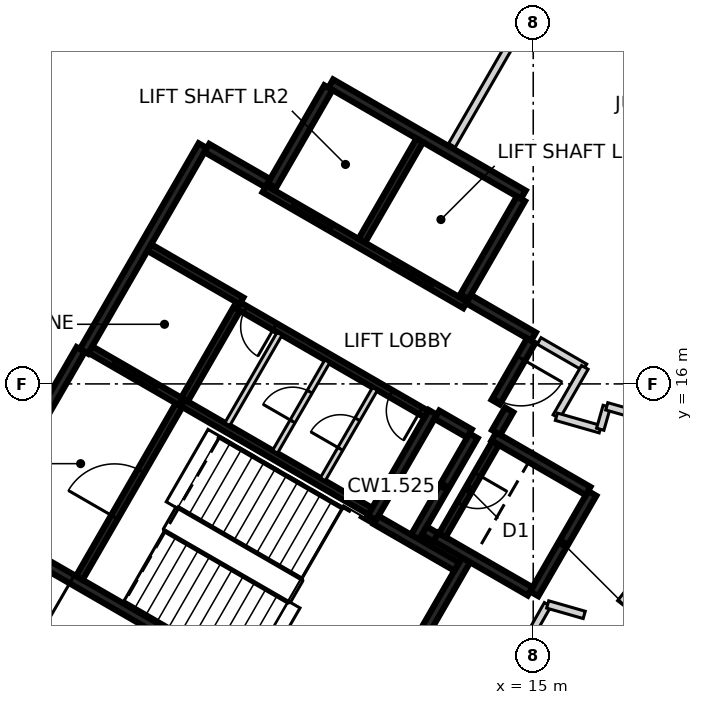
"""IFC4 building model, lengths in metres.
Left out: names, types, materials, properties, quantities, classifications, styles, units other than length and angle.
Written with IfcOpenShell. Run it as: python <this file> out.ifc"""

import sys

from ifc_helpers import new_model, si_unit, direction, frame, frame_2d, origin, place, context, subcontext, project, spatial, rectangle, extrude, element, fill, save


model = new_model("IFC4")
c1 = context("Model", 3, precision=1e-05, world=origin(), true_north=direction((0.0, 1.0)))
c2 = subcontext(c1, "Body", "Model", "MODEL_VIEW")
j1 = project(units=[si_unit("LENGTHUNIT", "METRE"), si_unit("PLANEANGLEUNIT", "RADIAN")], contexts=[c1])
p1 = place(None, origin())
s1 = spatial("IfcSite", under=j1, at=p1, CompositionType="ELEMENT")
p2 = place(p1, origin())
s2 = spatial("IfcBuilding", under=s1, at=p2, CompositionType="ELEMENT")
p3 = place(p2, frame((0.0, 0.0, 53.0)))
s3 = spatial("IfcBuildingStorey", under=s2, at=p3, CompositionType="ELEMENT", Elevation=53.0)
p4 = place(p3, frame((10.42, 6.498, 0.0), z_axis=(0.0, 0.0, 1.0), x_axis=(-0.866021906294, 0.500006057782, 0.0)))
e1 = element("IfcWall", 1, at=p4, inside=s3, PredefinedType="SHEAR", context=c2, shape_type="SweptSolid", body=[
    extrude(rectangle(XDim=11.55, YDim=0.25, at=frame_2d((5.775, 0.0))), origin(), (0.0, 0.0, 1.0), 3.125),
])
p5 = place(p4, frame((10.025, 0.0, 0.0)))
e2 = element("IfcOpeningElement", 2, at=p5, cuts=e1, PredefinedType="OPENING", context=c2, shape_type="SweptSolid", body=[
    extrude(rectangle(XDim=1.2, YDim=2.1, at=frame_2d((0.6, 1.05))), frame((0.0, 0.135, 0.0), z_axis=(0.0, -1.0, 0.0), x_axis=(1.0, 0.0, 0.0)), (0.0, 0.0, 1.0), 0.27),
])
p6 = place(p4, frame((8.725, 0.0, 0.0)))
e3 = element("IfcOpeningElement", 3, at=p6, cuts=e1, PredefinedType="OPENING", context=c2, shape_type="SweptSolid", body=[
    extrude(rectangle(XDim=1.2, YDim=2.1, at=frame_2d((0.6, 1.05))), frame((0.0, 0.135, 0.0), z_axis=(0.0, -1.0, 0.0), x_axis=(1.0, 0.0, 0.0)), (0.0, 0.0, 1.0), 0.27),
])
p7 = place(p3, frame((3.179, 16.856, 0.0), z_axis=(0.0, 0.0, 1.0), x_axis=(0.500004234368, 0.866022959057, 0.0)))
e4 = element("IfcWall", 4, at=p7, inside=s3, PredefinedType="SHEAR", context=c2, shape_type="SweptSolid", body=[
    extrude(rectangle(XDim=6.25, YDim=0.25, at=frame_2d((3.125, 0.0))), origin(), (0.0, 0.0, 1.0), 3.125),
])
p8 = place(p3, frame((9.673, 23.903, 0.0), z_axis=(0.0, 0.0, 1.0), x_axis=(0.86603616409, -0.499981362141, 0.0)))
e5 = element("IfcWall", 5, at=p8, inside=s3, PredefinedType="SHEAR", context=c2, shape_type="SweptSolid", body=[
    extrude(rectangle(XDim=5.85, YDim=0.25, at=frame_2d((2.925, 0.0))), origin(), (0.0, 0.0, 1.0), 3.125),
])
p9 = place(p3, frame((0.48, 12.381, 0.0), z_axis=(0.0, 0.0, 1.0), x_axis=(0.49999885962, 0.866026062182, 0.0)))
e6 = element("IfcWall", 6, at=p9, inside=s3, PredefinedType="SHEAR", context=c2, shape_type="SweptSolid", body=[
    extrude(rectangle(XDim=5.225, YDim=0.25, at=frame_2d((2.612, 0.0))), origin(), (0.0, 0.0, 1.0), 3.125),
])
p10 = place(p9, frame((1.95, 0.0, 0.0)))
e7 = element("IfcOpeningElement", 7, at=p10, cuts=e6, PredefinedType="OPENING", context=c2, shape_type="SweptSolid", body=[
    extrude(rectangle(XDim=1.2, YDim=2.1, at=frame_2d((0.6, 1.05))), frame((0.0, 0.135, 0.0), z_axis=(0.0, -1.0, 0.0), x_axis=(1.0, 0.0, 0.0)), (0.0, 0.0, 1.0), 0.27),
])
p11 = place(p3, frame((13.238, 11.378, 0.0), z_axis=(0.0, 0.0, 1.0), x_axis=(-0.500008851346, -0.866020293397, 0.0)))
e8 = element("IfcWall", 8, at=p11, inside=s3, PredefinedType="SHEAR", context=c2, shape_type="SweptSolid", body=[
    extrude(rectangle(XDim=5.51, YDim=0.25, at=frame_2d((2.755, 0.0))), origin(), (0.0, 0.0, 1.0), 3.125),
])
p12 = place(p3, frame((12.357, 15.252, 0.0), z_axis=(0.0, 0.0, 1.0), x_axis=(-0.500028443584, -0.866008981251, 0.0)))
e9 = element("IfcWall", 9, at=p12, inside=s3, PredefinedType="SHEAR", context=c2, shape_type="SweptSolid", body=[
    extrude(rectangle(XDim=3.2, YDim=0.25, at=frame_2d((1.6, 0.0))), origin(), (0.0, 0.0, 1.0), 3.125),
])
for number, where, z_axis, x_axis in (
    (10, (8.123, 21.219, 0.0), (0.0, 0.0, 1.0), (0.5, 0.866, 0.0)),
    (11, (14.676, 20.87, 0.0), (0.0, 0.0, 1.0), (-0.5, -0.866, 0.0)),
):
    element("IfcWall", number, at=place(p3, frame(where, z_axis=z_axis, x_axis=x_axis)), inside=s3, PredefinedType="SHEAR", context=c2, shape_type="SweptSolid", body=[
        extrude(rectangle(XDim=2.975, YDim=0.25, at=frame_2d((1.487, 0.0))), origin(), (0.0, 0.0, 1.0), 3.125),
    ])
p13 = place(p3, frame((16.552, 13.119, 0.0), z_axis=(0.0, 0.0, 1.0), x_axis=(-0.499978833458, -0.866037623948, 0.0)))
e12 = element("IfcWall", 12, at=p13, inside=s3, PredefinedType="SHEAR", context=c2, shape_type="SweptSolid", body=[
    extrude(rectangle(XDim=3.05, YDim=0.25, at=frame_2d((1.525, 0.0))), origin(), (0.0, 0.0, 1.0), 3.125),
])
p14 = place(p3, frame((14.918, 10.54, 0.0), z_axis=(0.0, 0.0, 1.0), x_axis=(-0.866063538972, 0.499933942099, 0.0)))
e13 = element("IfcWall", 13, at=p14, inside=s3, PredefinedType="SHEAR", context=c2, shape_type="SweptSolid", body=[
    extrude(rectangle(XDim=2.865, YDim=0.25, at=frame_2d((1.432, 0.0))), origin(), (0.0, 0.0, 1.0), 3.125),
])
p15 = place(p3, frame((13.963, 14.614, 0.0), z_axis=(0.0, 0.0, 1.0), x_axis=(0.866042235819, -0.499970844928, 0.0)))
e14 = element("IfcWall", 14, at=p15, inside=s3, PredefinedType="SHEAR", context=c2, shape_type="SweptSolid", body=[
    extrude(rectangle(XDim=2.865, YDim=0.25, at=frame_2d((1.432, 0.0))), origin(), (0.0, 0.0, 1.0), 3.125),
])
p16 = place(p3, frame((11.888, 11.961, 0.0), z_axis=(0.0, 0.0, 1.0), x_axis=(0.500003324108, 0.866023484601, 0.0)))
e15 = element("IfcWall", 15, at=p16, inside=s3, PredefinedType="SHEAR", context=c2, shape_type="SweptSolid", body=[
    extrude(rectangle(XDim=3.085, YDim=0.25, at=frame_2d((1.542, 0.0))), origin(), (0.0, 0.0, 1.0), 3.125),
])
p17 = place(p3, frame((10.865, 12.418, 0.0), z_axis=(0.0, 0.0, 1.0), x_axis=(0.866026229868, -0.499998569178, 0.0)))
e16 = element("IfcWall", 16, at=p17, inside=s3, PredefinedType="SHEAR", context=c2, shape_type="SweptSolid", body=[
    extrude(rectangle(XDim=2.449, YDim=0.25, at=frame_2d((1.225, 0.0))), origin(), (0.0, 0.0, 1.0), 3.125),
])
p18 = place(p3, frame((13.297, 18.231, 0.0), z_axis=(0.0, 0.0, 1.0), x_axis=(0.866043531843, -0.499968599967, 0.0)))
e17 = element("IfcWall", 17, at=p18, inside=s3, PredefinedType="SHEAR", context=c2, shape_type="SweptSolid", body=[
    extrude(rectangle(XDim=1.975, YDim=0.25, at=frame_2d((0.987, 0.0))), origin(), (0.0, 0.0, 1.0), 3.125),
])
p19 = place(p3, frame((6.413, 22.206, 0.0), z_axis=(0.0, 0.0, 1.0), x_axis=(0.866016279763, -0.500015802937, 0.0)))
e18 = element("IfcWall", 18, at=p19, inside=s3, PredefinedType="SHEAR", context=c2, shape_type="SweptSolid", body=[
    extrude(rectangle(XDim=1.849, YDim=0.25, at=frame_2d((0.925, 0.0))), origin(), (0.0, 0.0, 1.0), 3.125),
])
p20 = place(p3, frame((14.945, 17.135, 0.0), z_axis=(0.0, 0.0, 1.0), x_axis=(-0.499983108224, -0.866035156036, 0.0)))
e19 = element("IfcWall", 19, at=p20, inside=s3, PredefinedType="SHEAR", context=c2, shape_type="SweptSolid", body=[
    extrude(rectangle(XDim=1.865, YDim=0.25, at=frame_2d((0.932, 0.0))), origin(), (0.0, 0.0, 1.0), 3.125),
])
p21 = place(p20, frame((0.535, 0.0, 0.0)))
e20 = element("IfcOpeningElement", 20, at=p21, cuts=e19, PredefinedType="OPENING", context=c2, shape_type="SweptSolid", body=[
    extrude(rectangle(XDim=1.25, YDim=2.1, at=frame_2d((0.625, 1.05))), frame((0.0, 0.135, 0.0), z_axis=(0.0, -1.0, 0.0), x_axis=(1.0, 0.0, 0.0)), (0.0, 0.0, 1.0), 0.27),
])
p22 = place(p3, frame((13.322, 14.695, 0.0), z_axis=(0.0, 0.0, 1.0), x_axis=(-0.866017078145, 0.500014420154, 0.0)))
e21 = element("IfcWall", 21, at=p22, inside=s3, PredefinedType="SHEAR", context=c2, shape_type="SweptSolid", body=[
    extrude(rectangle(XDim=0.989, YDim=0.25, at=frame_2d((0.495, 0.0))), origin(), (0.0, 0.0, 1.0), 3.125),
])
p23 = place(p3, frame((14.368, 15.315, 0.0), z_axis=(0.0, 0.0, 1.0), x_axis=(-0.499897359611, -0.866084655132, 0.0)))
e22 = element("IfcWall", 22, at=p23, inside=s3, PredefinedType="SHEAR", context=c2, shape_type="SweptSolid", body=[
    extrude(rectangle(XDim=0.685, YDim=0.25, at=frame_2d((0.342, 0.0))), origin(), (0.0, 0.0, 1.0), 3.125),
])
p24 = place(p3, frame((12.433, 11.964, 0.0), z_axis=(0.0, 0.0, 1.0), x_axis=(-0.866055875208, 0.499947218231, 0.0)))
e23 = element("IfcWall", 23, at=p24, inside=s3, PredefinedType="SHEAR", context=c2, shape_type="SweptSolid", body=[
    extrude(rectangle(XDim=0.345, YDim=0.25, at=frame_2d((0.172, 0.0))), origin(), (0.0, 0.0, 1.0), 3.125),
])
p25 = place(p3, frame((13.21, 18.08, 0.0), z_axis=(0.0, 0.0, 1.0), x_axis=(-0.866030299012, 0.499991521122, 0.0)))
e24 = element("IfcWall", 24, at=p25, inside=s3, PredefinedType="SHEAR", context=c2, shape_type="SweptSolid", body=[
    extrude(rectangle(XDim=6.1, YDim=0.2, at=frame_2d((3.05, 0.0))), origin(), (0.0, 0.0, 1.0), 3.125),
])
p26 = place(p25, frame((1.0, 0.0, 0.0)))
e25 = element("IfcOpeningElement", 25, at=p26, cuts=e24, PredefinedType="OPENING", context=c2, shape_type="SweptSolid", body=[
    extrude(rectangle(XDim=1.2, YDim=2.1, at=frame_2d((0.6, 1.05))), frame((0.0, 0.11, 0.0), z_axis=(0.0, -1.0, 0.0), x_axis=(1.0, 0.0, 0.0)), (0.0, 0.0, 1.0), 0.22),
])
p27 = place(p25, frame((4.05, 0.0, 0.0)))
e26 = element("IfcOpeningElement", 26, at=p27, cuts=e24, PredefinedType="OPENING", context=c2, shape_type="SweptSolid", body=[
    extrude(rectangle(XDim=1.2, YDim=2.1, at=frame_2d((0.6, 1.05))), frame((0.0, 0.11, 0.0), z_axis=(0.0, -1.0, 0.0), x_axis=(1.0, 0.0, 0.0)), (0.0, 0.0, 1.0), 0.22),
])
p28 = place(p3, frame((5.775, 15.502, 0.0), z_axis=(0.0, 0.0, 1.0), x_axis=(0.866020080793, -0.500009219579, 0.0)))
e27 = element("IfcWall", 27, at=p28, inside=s3, PredefinedType="SHEAR", context=c2, shape_type="SweptSolid", body=[
    extrude(rectangle(XDim=5.699, YDim=0.2, at=frame_2d((2.85, 0.0))), origin(), (0.0, 0.0, 1.0), 3.125),
])
p29 = place(p3, frame((12.185, 15.207, 0.0), z_axis=(0.0, 0.0, 1.0), x_axis=(-0.866020080793, 0.500009219579, 0.0)))
e28 = element("IfcWall", 28, at=p29, inside=s3, PredefinedType="SHEAR", context=c2, shape_type="SweptSolid", body=[
    extrude(rectangle(XDim=5.699, YDim=0.2, at=frame_2d((2.85, 0.0))), origin(), (0.0, 0.0, 1.0), 3.125),
])
p30 = place(p29, frame((0.174, 0.0, 0.0)))
e29 = element("IfcOpeningElement", 29, at=p30, cuts=e28, PredefinedType="OPENING", context=c2, shape_type="SweptSolid", body=[
    extrude(rectangle(XDim=0.9, YDim=2.1, at=frame_2d((0.45, 1.05))), frame((0.0, 0.11, 0.0), z_axis=(0.0, -1.0, 0.0), x_axis=(1.0, 0.0, 0.0)), (0.0, 0.0, 1.0), 0.22),
])
p31 = place(p29, frame((4.599, 0.0, 0.0)))
e30 = element("IfcOpeningElement", 30, at=p31, cuts=e28, PredefinedType="OPENING", context=c2, shape_type="SweptSolid", body=[
    extrude(rectangle(XDim=0.9, YDim=2.1, at=frame_2d((0.45, 1.05))), frame((0.0, 0.11, 0.0), z_axis=(0.0, -1.0, 0.0), x_axis=(1.0, 0.0, 0.0)), (0.0, 0.0, 1.0), 0.22),
])
p32 = place(p3, frame((3.057, 10.895, 0.0), z_axis=(0.0, 0.0, 1.0), x_axis=(0.499989418164, 0.866031513124, 0.0)))
e31 = element("IfcWall", 31, at=p32, inside=s3, PredefinedType="SHEAR", context=c2, shape_type="SweptSolid", body=[
    extrude(rectangle(XDim=5.251, YDim=0.2, at=frame_2d((2.625, 0.0))), origin(), (0.0, 0.0, 1.0), 3.125),
])
p33 = place(p32, frame((1.849, 0.0, 0.0)))
e32 = element("IfcOpeningElement", 32, at=p33, cuts=e31, PredefinedType="OPENING", context=c2, shape_type="SweptSolid", body=[
    extrude(rectangle(XDim=1.4, YDim=2.1, at=frame_2d((0.7, 1.05))), frame((0.0, 0.11, 0.0), z_axis=(0.0, -1.0, 0.0), x_axis=(1.0, 0.0, 0.0)), (0.0, 0.0, 1.0), 0.22),
])
p34 = place(p3, frame((10.489, 19.767, 0.0), z_axis=(0.0, 0.0, 1.0), x_axis=(0.499946628782, 0.866056215479, 0.0)))
e33 = element("IfcWall", 33, at=p34, inside=s3, PredefinedType="SHEAR", context=c2, shape_type="SweptSolid", body=[
    extrude(rectangle(XDim=3.048, YDim=0.2, at=frame_2d((1.524, 0.0))), origin(), (0.0, 0.0, 1.0), 3.125),
])
p35 = place(p3, frame((14.008, 14.442, 0.0), z_axis=(0.0, 0.0, 1.0), x_axis=(-0.499986818241, -0.866033014143, 0.0)))
e34 = element("IfcWall", 34, at=p35, inside=s3, PredefinedType="SHEAR", context=c2, shape_type="SweptSolid", body=[
    extrude(rectangle(XDim=2.798, YDim=0.2, at=frame_2d((1.399, 0.0))), origin(), (0.0, 0.0, 1.0), 3.125),
])
p36 = place(p35, frame((0.949, 0.0, 0.0)))
e35 = element("IfcOpeningElement", 35, at=p36, cuts=e34, PredefinedType="OPENING", context=c2, shape_type="SweptSolid", body=[
    extrude(rectangle(XDim=0.9, YDim=2.1, at=frame_2d((0.45, 1.05))), frame((0.0, 0.11, 0.0), z_axis=(0.0, -1.0, 0.0), x_axis=(1.0, 0.0, 0.0)), (0.0, 0.0, 1.0), 0.22),
])
p37 = place(p3, frame((7.199, 17.97, 0.0), z_axis=(0.0, 0.0, 1.0), x_axis=(-0.499968400327, -0.866043647095, 0.0)))
e36 = element("IfcWall", 36, at=p37, inside=s3, PredefinedType="SHEAR", context=c2, shape_type="SweptSolid", body=[
    extrude(rectangle(XDim=2.75, YDim=0.2, at=frame_2d((1.375, 0.0))), origin(), (0.0, 0.0, 1.0), 3.125),
])
p38 = place(p3, frame((5.725, 15.531, 0.0), z_axis=(0.0, 0.0, 1.0), x_axis=(-0.866037306777, 0.499979382845, 0.0)))
e37 = element("IfcWall", 37, at=p38, inside=s3, PredefinedType="SHEAR", context=c2, shape_type="SweptSolid", body=[
    extrude(rectangle(XDim=2.742, YDim=0.2, at=frame_2d((1.371, 0.0))), origin(), (0.0, 0.0, 1.0), 3.125),
])
p39 = place(p38, frame((0.743, 0.0, 0.0)))
e38 = element("IfcOpeningElement", 38, at=p39, cuts=e37, PredefinedType="OPENING", context=c2, shape_type="SweptSolid", body=[
    extrude(rectangle(XDim=1.3, YDim=2.1, at=frame_2d((0.65, 1.05))), frame((0.0, 0.11, 0.0), z_axis=(0.0, -1.0, 0.0), x_axis=(1.0, 0.0, 0.0)), (0.0, 0.0, 1.0), 0.22),
])
p40 = place(p3, frame((4.901, 19.586, 0.0), z_axis=(0.0, 0.0, 1.0), x_axis=(0.866022890907, -0.500004352405, 0.0)))
e39 = element("IfcWall", 39, at=p40, inside=s3, PredefinedType="SHEAR", context=c2, shape_type="SweptSolid", body=[
    extrude(rectangle(XDim=2.799, YDim=0.2, at=frame_2d((1.399, 0.0))), origin(), (0.0, 0.0, 1.0), 3.125),
])
p41 = place(p3, frame((9.462, 13.489, 0.0), z_axis=(0.0, 0.0, 1.0), x_axis=(0.50002746344, 0.86600954718, 0.0)))
e40 = element("IfcWall", 40, at=p41, inside=s3, PredefinedType="PARTITIONING", context=c2, shape_type="SweptSolid", body=[
    extrude(rectangle(XDim=2.748, YDim=0.15, at=frame_2d((1.374, 0.0))), origin(), (0.0, 0.0, 1.0), 3.125),
])
p42 = place(p41, frame((0.924, 0.0, 0.0)))
e41 = element("IfcOpeningElement", 41, at=p42, cuts=e40, PredefinedType="OPENING", context=c2, shape_type="SweptSolid", body=[
    extrude(rectangle(XDim=0.9, YDim=2.1, at=frame_2d((0.45, 1.05))), frame((0.0, 0.085, 0.0), z_axis=(0.0, -1.0, 0.0), x_axis=(1.0, 0.0, 0.0)), (0.0, 0.0, 1.0), 0.17),
])
p43 = place(p3, frame((8.207, 14.214, 0.0), z_axis=(0.0, 0.0, 1.0), x_axis=(0.499922376475, 0.866070215109, 0.0)))
e42 = element("IfcWall", 42, at=p43, inside=s3, PredefinedType="PARTITIONING", context=c2, shape_type="SweptSolid", body=[
    extrude(rectangle(XDim=2.749, YDim=0.15, at=frame_2d((1.374, 0.0))), origin(), (0.0, 0.0, 1.0), 3.125),
])
p44 = place(p43, frame((0.924, 0.0, 0.0)))
e43 = element("IfcOpeningElement", 43, at=p44, cuts=e42, PredefinedType="OPENING", context=c2, shape_type="SweptSolid", body=[
    extrude(rectangle(XDim=0.9, YDim=2.1, at=frame_2d((0.45, 1.05))), frame((0.0, 0.085, 0.0), z_axis=(0.0, -1.0, 0.0), x_axis=(1.0, 0.0, 0.0)), (0.0, 0.0, 1.0), 0.17),
])
p45 = place(p3, frame((6.951, 14.939, 0.0), z_axis=(0.0, 0.0, 1.0), x_axis=(0.50002746344, 0.86600954718, 0.0)))
e44 = element("IfcWall", 44, at=p45, inside=s3, PredefinedType="PARTITIONING", context=c2, shape_type="SweptSolid", body=[
    extrude(rectangle(XDim=2.748, YDim=0.15, at=frame_2d((1.374, 0.0))), origin(), (0.0, 0.0, 1.0), 3.125),
])
p46 = place(p3, frame((12.432, 4.992, 0.0), z_axis=(0.0, 0.0, 1.0), x_axis=(0.492790102015, 0.870148214591, 0.0)))
e45 = element("IfcWall", 45, at=p46, inside=s3, PredefinedType="PARTITIONING", context=c2, shape_type="SweptSolid", body=[
    extrude(rectangle(XDim=5.981, YDim=0.2, at=frame_2d((2.991, 0.0))), origin(), (0.0, 0.0, 1.0), 3.125),
])
p47 = place(p3, frame((15.156, 17.13, 0.0), z_axis=(0.0, 0.0, 1.0), x_axis=(0.865755062894, -0.500467952093, 0.0)))
e46 = element("IfcWall", 46, at=p47, inside=s3, PredefinedType="PARTITIONING", context=c2, shape_type="SweptSolid", body=[
    extrude(rectangle(XDim=1.389, YDim=0.2, at=frame_2d((0.694, 0.0))), origin(), (0.0, 0.0, 1.0), 3.125),
])
p48 = place(p3, frame((15.38, 10.197, 0.0), z_axis=(0.0, 0.0, 1.0), x_axis=(0.961523947641, -0.274721127897, 0.0)))
e47 = element("IfcWall", 47, at=p48, inside=s3, PredefinedType="PARTITIONING", context=c2, shape_type="SweptSolid", body=[
    extrude(rectangle(XDim=1.001, YDim=0.2, at=frame_2d((0.5, 0.0))), origin(), (0.0, 0.0, 1.0), 3.125),
])
p49 = place(p3, frame((15.609, 15.136, 0.0), z_axis=(0.0, 0.0, 1.0), x_axis=(0.499501622561, 0.866312950993, 0.0)))
e48 = element("IfcWall", 48, at=p49, inside=s3, PredefinedType="PARTITIONING", context=c2, shape_type="SweptSolid", body=[
    extrude(rectangle(XDim=1.5, YDim=0.2, at=frame_2d((0.75, 0.0))), origin(), (0.0, 0.0, 1.0), 3.125),
])
p50 = place(p3, frame((15.609, 15.136, 0.0), z_axis=(0.0, 0.0, 1.0), x_axis=(0.961662011825, -0.274237442763, 0.0)))
e49 = element("IfcWall", 49, at=p50, inside=s3, PredefinedType="PARTITIONING", context=c2, shape_type="SweptSolid", body=[
    extrude(rectangle(XDim=1.2, YDim=0.2, at=frame_2d((0.6, 0.0))), origin(), (0.0, 0.0, 1.0), 3.125),
])
p51 = place(p3, frame((16.763, 14.807, 0.0), z_axis=(0.0, 0.0, 1.0), x_axis=(0.274464026122, 0.961597368115, 0.0)))
e50 = element("IfcWall", 50, at=p51, inside=s3, PredefinedType="PARTITIONING", context=c2, shape_type="SweptSolid", body=[
    extrude(rectangle(XDim=0.627, YDim=0.2, at=frame_2d((0.313, 0.0))), origin(), (0.0, 0.0, 1.0), 3.125),
])
p52 = place(p3, frame((16.935, 15.41, 0.0), z_axis=(0.0, 0.0, 1.0), x_axis=(0.961602664273, -0.274445470107, 0.0)))
e51 = element("IfcWall", 51, at=p52, inside=s3, PredefinedType="PARTITIONING", context=c2, shape_type="SweptSolid", body=[
    extrude(rectangle(XDim=0.936, YDim=0.2, at=frame_2d((0.468, 0.0))), origin(), (0.0, 0.0, 1.0), 3.125),
])
p53 = place(p3, frame((17.299, 10.235, 0.0), z_axis=(0.0, 0.0, 1.0), x_axis=(0.61377461522, 0.789481299153, 0.0)))
e52 = element("IfcWall", 52, at=p53, inside=s3, PredefinedType="PARTITIONING", context=c2, shape_type="SweptSolid", body=[
    extrude(rectangle(XDim=2.851, YDim=0.2, at=frame_2d((1.426, 0.0))), origin(), (0.0, 0.0, 1.0), 3.125),
])
p54 = place(p3, frame((12.861, 22.276, 0.0), z_axis=(0.0, 0.0, 1.0), x_axis=(0.499824227645, 0.86612686222, 0.0)))
e53 = element("IfcWall", 53, at=p54, inside=s3, PredefinedType="PARTITIONING", context=c2, shape_type="SweptSolid", body=[
    extrude(rectangle(XDim=7.753, YDim=0.2, at=frame_2d((3.876, 0.0))), origin(), (0.0, 0.0, 1.0), 3.125),
])
p55 = place(p39, origin())
e54 = element("IfcDoor", 54, at=p55, inside=s3, OperationType="SLIDING_TO_LEFT", PredefinedType="DOOR", context=c2, shape_type="SweptSolid", body=[
    extrude(rectangle(XDim=1.3, YDim=2.1, at=frame_2d((0.65, 1.05))), frame((0.0, 0.025, 0.0), z_axis=(0.0, -1.0, 0.0), x_axis=(1.0, 0.0, 0.0)), (0.0, 0.0, 1.0), 0.05),
])
fill(e38, e54)
p56 = place(p26, origin())
e55 = element("IfcDoor", 55, at=p56, inside=s3, OperationType="DOUBLE_DOOR_SLIDING", PredefinedType="DOOR", context=c2, shape_type="SweptSolid", body=[
    extrude(rectangle(XDim=1.2, YDim=2.1, at=frame_2d((0.6, 1.05))), frame((0.0, 0.025, 0.0), z_axis=(0.0, -1.0, 0.0), x_axis=(1.0, 0.0, 0.0)), (0.0, 0.0, 1.0), 0.05),
])
fill(e25, e55)
p57 = place(p27, origin())
e56 = element("IfcDoor", 56, at=p57, inside=s3, OperationType="DOUBLE_DOOR_SLIDING", PredefinedType="DOOR", context=c2, shape_type="SweptSolid", body=[
    extrude(rectangle(XDim=1.2, YDim=2.1, at=frame_2d((0.6, 1.05))), frame((0.0, 0.025, 0.0), z_axis=(0.0, -1.0, 0.0), x_axis=(1.0, 0.0, 0.0)), (0.0, 0.0, 1.0), 0.05),
])
fill(e26, e56)
p58 = place(p21, origin())
e57 = element("IfcDoor", 57, at=p58, inside=s3, OperationType="SINGLE_SWING_LEFT", PredefinedType="DOOR", context=c2, shape_type="SweptSolid", body=[
    extrude(rectangle(XDim=1.25, YDim=2.1, at=frame_2d((0.625, 1.05))), frame((0.0, 0.025, 0.0), z_axis=(0.0, -1.0, 0.0), x_axis=(1.0, 0.0, 0.0)), (0.0, 0.0, 1.0), 0.05),
])
fill(e20, e57)
p59 = place(p6, origin())
e58 = element("IfcDoor", 58, at=p59, inside=s3, OperationType="SINGLE_SWING_RIGHT", PredefinedType="DOOR", context=c2, shape_type="SweptSolid", body=[
    extrude(rectangle(XDim=1.2, YDim=2.1, at=frame_2d((0.6, 1.05))), frame((0.0, 0.025, 0.0), z_axis=(0.0, -1.0, 0.0), x_axis=(1.0, 0.0, 0.0)), (0.0, 0.0, 1.0), 0.05),
])
fill(e3, e58)
p60 = place(p33, origin())
e59 = element("IfcDoor", 59, at=p60, inside=s3, OperationType="SINGLE_SWING_LEFT", PredefinedType="DOOR", context=c2, shape_type="SweptSolid", body=[
    extrude(rectangle(XDim=1.4, YDim=2.1, at=frame_2d((0.7, 1.05))), frame((0.0, 0.025, 0.0), z_axis=(0.0, -1.0, 0.0), x_axis=(1.0, 0.0, 0.0)), (0.0, 0.0, 1.0), 0.05),
])
fill(e32, e59)
p61 = place(p30, origin())
e60 = element("IfcDoor", 60, at=p61, inside=s3, OperationType="SINGLE_SWING_RIGHT", PredefinedType="DOOR", context=c2, shape_type="SweptSolid", body=[
    extrude(rectangle(XDim=0.9, YDim=2.1, at=frame_2d((0.45, 1.05))), frame((0.0, 0.025, 0.0), z_axis=(0.0, -1.0, 0.0), x_axis=(1.0, 0.0, 0.0)), (0.0, 0.0, 1.0), 0.05),
])
fill(e29, e60)
p62 = place(p42, origin())
e61 = element("IfcDoor", 61, at=p62, inside=s3, OperationType="SINGLE_SWING_LEFT", PredefinedType="DOOR", context=c2, shape_type="SweptSolid", body=[
    extrude(rectangle(XDim=0.9, YDim=2.1, at=frame_2d((0.45, 1.05))), frame((0.0, 0.025, 0.0), z_axis=(0.0, -1.0, 0.0), x_axis=(1.0, 0.0, 0.0)), (0.0, 0.0, 1.0), 0.05),
])
fill(e41, e61)
p63 = place(p44, origin())
e62 = element("IfcDoor", 62, at=p63, inside=s3, OperationType="SINGLE_SWING_RIGHT", PredefinedType="DOOR", context=c2, shape_type="SweptSolid", body=[
    extrude(rectangle(XDim=0.9, YDim=2.1, at=frame_2d((0.45, 1.05))), frame((0.0, 0.025, 0.0), z_axis=(0.0, -1.0, 0.0), x_axis=(1.0, 0.0, 0.0)), (0.0, 0.0, 1.0), 0.05),
])
fill(e43, e62)
p64 = place(p31, origin())
e63 = element("IfcDoor", 63, at=p64, inside=s3, OperationType="SINGLE_SWING_LEFT", PredefinedType="DOOR", context=c2, shape_type="SweptSolid", body=[
    extrude(rectangle(XDim=0.9, YDim=2.1, at=frame_2d((0.45, 1.05))), frame((0.0, 0.025, 0.0), z_axis=(0.0, -1.0, 0.0), x_axis=(1.0, 0.0, 0.0)), (0.0, 0.0, 1.0), 0.05),
])
fill(e30, e63)
p65 = place(p36, origin())
e64 = element("IfcDoor", 64, at=p65, inside=s3, OperationType="SINGLE_SWING_RIGHT", PredefinedType="DOOR", context=c2, shape_type="SweptSolid", body=[
    extrude(rectangle(XDim=0.9, YDim=2.1, at=frame_2d((0.45, 1.05))), frame((0.0, 0.025, 0.0), z_axis=(0.0, -1.0, 0.0), x_axis=(1.0, 0.0, 0.0)), (0.0, 0.0, 1.0), 0.05),
])
fill(e35, e64)
save(model, sys.argv[1])
